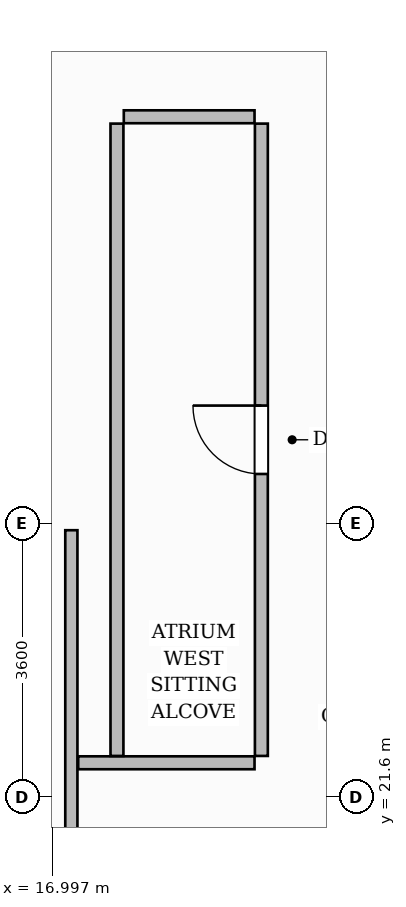
"""IFC4 building model, lengths in metres.
Left out: names, types, materials, properties, quantities, classifications, styles, units other than length and angle.
Written with IfcOpenShell. Run it as: python <this file> out.ifc"""

import sys

from ifc_helpers import new_model, si_unit, direction, frame, frame_2d, origin, place, context, subcontext, project, spatial, rectangle, extrude, source, transform, mapped, element, fill, save


model = new_model("IFC4")
c1 = context("Model", 3, precision=1e-05, world=origin(), true_north=direction((0.0, 1.0)))
c2 = subcontext(c1, "Body", "Model", "MODEL_VIEW")
j1 = project(units=[si_unit("LENGTHUNIT", "METRE"), si_unit("PLANEANGLEUNIT", "RADIAN")], contexts=[c1])
p1 = place(None, origin())
s1 = spatial("IfcSite", under=j1, at=p1, CompositionType="ELEMENT")
p2 = place(p1, origin())
s2 = spatial("IfcBuilding", under=s1, at=p2, CompositionType="ELEMENT")
p3 = place(p2, frame((0.0, 0.0, 87.9)))
s3 = spatial("IfcBuildingStorey", under=s2, at=p3, CompositionType="ELEMENT", Elevation=87.9)
p4 = place(p3, frame((17.25, 11.96, 0.0), z_axis=(0.0, 0.0, 1.0), x_axis=(0.0, 1.0, 0.0)))
e1 = element("IfcWall", 1, at=p4, inside=s3, PredefinedType="PARTITIONING", context=c2, shape_type="SweptSolid", body=[
    extrude(rectangle(XDim=13.15, YDim=0.16, at=frame_2d((6.575, 0.0))), origin(), (0.0, 0.0, 1.0), 3.45),
])
p5 = place(p3, frame((17.34, 22.05, 0.0), z_axis=(0.0, 0.0, 1.0), x_axis=(1.0, 0.0, 0.0)))
e2 = element("IfcWall", 2, at=p5, inside=s3, PredefinedType="PARTITIONING", context=c2, shape_type="SweptSolid", body=[
    extrude(rectangle(XDim=2.32, YDim=0.17, at=frame_2d((1.16, 0.0))), origin(), (0.0, 0.0, 1.0), 3.45),
])
p6 = place(p3, frame((17.94, 30.55, 0.0), z_axis=(0.0, 0.0, 1.0), x_axis=(1.0, 0.0, 0.0)))
e3 = element("IfcWall", 3, at=p6, inside=s3, PredefinedType="PARTITIONING", context=c2, shape_type="SweptSolid", body=[
    extrude(rectangle(XDim=1.72, YDim=0.17, at=frame_2d((0.86, 0.0))), origin(), (0.0, 0.0, 1.0), 3.45),
])
p7 = place(p3, frame((17.85, 22.14, 0.0), z_axis=(0.0, 0.0, 1.0), x_axis=(0.0, 1.0, 0.0)))
e4 = element("IfcWall", 4, at=p7, inside=s3, PredefinedType="PARTITIONING", context=c2, shape_type="SweptSolid", body=[
    extrude(rectangle(XDim=8.32, YDim=0.17, at=frame_2d((4.16, 0.0))), origin(), (0.0, 0.0, 1.0), 3.45),
])
p8 = place(p3, frame((19.75, 22.14, 0.0), z_axis=(0.0, 0.0, 1.0), x_axis=(0.0, 1.0, 0.0)))
e5 = element("IfcWall", 5, at=p8, inside=s3, PredefinedType="PARTITIONING", context=c2, shape_type="SweptSolid", body=[
    extrude(rectangle(XDim=8.32, YDim=0.17, at=frame_2d((4.16, 0.0))), origin(), (0.0, 0.0, 1.0), 3.45),
])
p9 = place(p8, frame((3.71, 0.0, 0.0)))
e6 = element("IfcOpeningElement", 6, at=p9, cuts=e5, PredefinedType="OPENING", context=c2, shape_type="SweptSolid", body=[
    extrude(rectangle(XDim=0.9, YDim=2.15, at=frame_2d((0.45, 1.075))), frame((0.0, 0.095, 0.0), z_axis=(0.0, -1.0, 0.0), x_axis=(1.0, 0.0, 0.0)), (0.0, 0.0, 1.0), 0.19),
])
m1 = source(origin(), c2, "Body", "SweptSolid", [
    extrude(rectangle(XDim=0.9, YDim=2.15, at=frame_2d((0.45, 1.075))), frame((0.0, 0.025, 0.0), z_axis=(0.0, -1.0, 0.0), x_axis=(1.0, 0.0, 0.0)), (0.0, 0.0, 1.0), 0.05),
])
p10 = place(p9, origin())
e7 = element("IfcDoor", 7, at=p10, inside=s3, OperationType="SINGLE_SWING_RIGHT", PredefinedType="DOOR", context=c2, shape_type="MappedRepresentation", body=[
    mapped(m1, transform((0.0, 0.0, 0.0), scale=1.0)),
])
fill(e6, e7)
save(model, sys.argv[1])
